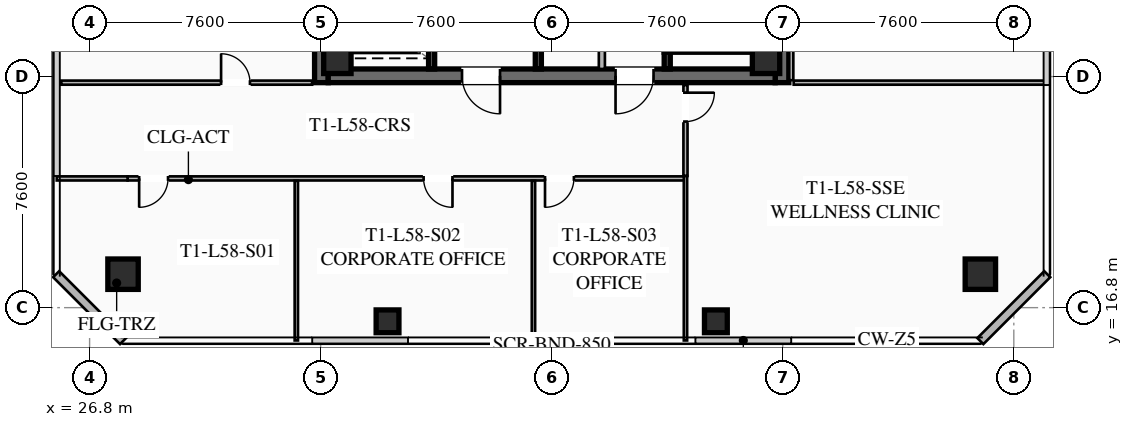
"""IFC4 building model, lengths in metres.
Left out: names, types, materials, properties, quantities, classifications, styles, units other than length and angle.
Written with IfcOpenShell. Run it as: python <this file> out.ifc"""

import sys

from ifc_helpers import new_model, si_unit, direction, frame, frame_2d, origin, origin_2d, place, context, subcontext, project, spatial, rectangle, hollow_rectangle, extrude, element, fill, save


model = new_model("IFC4")
c1 = context("Model", 3, precision=1e-05, world=origin(), true_north=direction((0.0, 1.0)))
c2 = subcontext(c1, "Body", "Model", "MODEL_VIEW")
j1 = project(units=[si_unit("LENGTHUNIT", "METRE"), si_unit("PLANEANGLEUNIT", "RADIAN")], contexts=[c1])
p1 = place(None, origin())
s1 = spatial("IfcSite", under=j1, at=p1, CompositionType="ELEMENT")
p2 = place(p1, origin())
s2 = spatial("IfcBuilding", under=s1, at=p2, CompositionType="ELEMENT")
p3 = place(p2, frame((0.0, 0.0, 214.85)))
s3 = spatial("IfcBuildingStorey", under=s2, at=p3, CompositionType="ELEMENT", Elevation=214.85)
for number, where, z_axis, x_axis in (
    (1, (34.425, 24.2, 0.0), (0.0, 0.0, 1.0), (0.0, 1.0, 0.0)),
    (2, (49.575, 39.8, 0.0), (0.0, 0.0, 1.0), (0.0, -1.0, 0.0)),
):
    element("IfcWall", number, at=place(p3, frame(where, z_axis=z_axis, x_axis=x_axis)), inside=s3, PredefinedType="SHEAR", context=c2, shape_type="SweptSolid", body=[
        extrude(rectangle(XDim=15.6, YDim=0.45, at=frame_2d((7.8, 0.0))), origin(), (0.0, 0.0, 1.0), 3.55),
    ])
p4 = place(p3, frame((49.35, 24.425, 0.0), z_axis=(0.0, 0.0, 1.0), x_axis=(-1.0, 0.0, 0.0)))
e3 = element("IfcWall", 3, at=p4, inside=s3, PredefinedType="SHEAR", context=c2, shape_type="SweptSolid", body=[
    extrude(rectangle(XDim=14.7, YDim=0.45, at=frame_2d((7.35, 0.0))), origin(), (0.0, 0.0, 1.0), 3.55),
])
p5 = place(p4, frame((9.05, 0.0, 0.0)))
e4 = element("IfcOpeningElement", 4, at=p5, cuts=e3, PredefinedType="OPENING", context=c2, shape_type="SweptSolid", body=[
    extrude(rectangle(XDim=1.25, YDim=2.25, at=frame_2d((0.625, 1.125))), frame((0.0, 0.235, 0.0), z_axis=(0.0, -1.0, 0.0), x_axis=(1.0, 0.0, 0.0)), (0.0, 0.0, 1.0), 0.47),
])
p6 = place(p4, frame((4.0, 0.0, 0.0)))
e5 = element("IfcOpeningElement", 5, at=p6, cuts=e3, PredefinedType="OPENING", context=c2, shape_type="SweptSolid", body=[
    extrude(rectangle(XDim=1.25, YDim=2.25, at=frame_2d((0.625, 1.125))), frame((0.0, 0.235, 0.0), z_axis=(0.0, -1.0, 0.0), x_axis=(1.0, 0.0, 0.0)), (0.0, 0.0, 1.0), 0.47),
])
for number, where, z_axis, x_axis in (
    (6, (34.95, 24.95, 0.0), (0.0, 0.0, 1.0), (1.0, 0.0, 0.0)),
    (7, (49.05, 24.95, 0.0), (0.0, 0.0, 1.0), (1.0, 0.0, 0.0)),
):
    element("IfcColumn", number, at=place(p3, frame(where, z_axis=z_axis, x_axis=x_axis)), inside=s3, PredefinedType="COLUMN", context=c2, shape_type="SweptSolid", body=[
        extrude(hollow_rectangle(XDim=0.9, YDim=0.9, WallThickness=0.04, at=origin_2d()), origin(), (0.0, 0.0, 1.0), 3.37),
    ])
for number, where, z_axis, x_axis in (
    (8, (27.9, 17.9, 0.0), (0.0, 0.0, 1.0), (1.0, 0.0, 0.0)),
    (9, (56.1, 17.9, 0.0), (0.0, 0.0, 1.0), (1.0, 0.0, 0.0)),
):
    element("IfcColumn", number, at=place(p3, frame(where, z_axis=z_axis, x_axis=x_axis)), inside=s3, PredefinedType="COLUMN", context=c2, shape_type="SweptSolid", body=[
        extrude(hollow_rectangle(XDim=1.0, YDim=1.0, WallThickness=0.04, at=origin_2d()), origin(), (0.0, 0.0, 1.0), 3.37),
    ])
for number, where, z_axis, x_axis in (
    (10, (36.6, 16.35, 0.0), (0.0, 0.0, 1.0), (1.0, 0.0, 0.0)),
    (11, (47.4, 16.35, 0.0), (0.0, 0.0, 1.0), (1.0, 0.0, 0.0)),
):
    element("IfcColumn", number, at=place(p3, frame(where, z_axis=z_axis, x_axis=x_axis)), inside=s3, PredefinedType="COLUMN", context=c2, shape_type="SweptSolid", body=[
        extrude(hollow_rectangle(XDim=0.75, YDim=0.75, WallThickness=0.032, at=origin_2d()), origin(), (0.0, 0.0, 1.0), 3.37),
    ])
for number, where, z_axis, x_axis in (
    (12, (27.9, 15.7, 0.0), (0.0, 0.0, 1.0), (-0.707, 0.707, 0.0)),
    (13, (58.3, 17.9, 0.0), (0.0, 0.0, 1.0), (-0.707, -0.707, 0.0)),
):
    element("IfcWall", number, at=place(p3, frame(where, z_axis=z_axis, x_axis=x_axis)), inside=s3, PredefinedType="SOLIDWALL", context=c2, shape_type="SweptSolid", body=[
        extrude(rectangle(XDim=3.111, YDim=0.28, at=frame_2d((1.556, 0.0))), origin(), (0.0, 0.0, 1.0), 3.37),
    ])
p7 = place(p3, frame((45.8, 32.8, 0.0), z_axis=(0.0, 0.0, 1.0), x_axis=(0.0, -1.0, 0.0)))
e14 = element("IfcWall", 14, at=p7, inside=s3, PredefinedType="SHEAR", context=c2, shape_type="SweptSolid", body=[
    extrude(rectangle(XDim=8.15, YDim=0.2, at=frame_2d((4.075, 0.0))), origin(), (0.0, 0.0, 1.0), 3.37),
])
p8 = place(p7, frame((0.45, 0.0, 0.0)))
e15 = element("IfcOpeningElement", 15, at=p8, cuts=e14, PredefinedType="OPENING", context=c2, shape_type="SweptSolid", body=[
    extrude(rectangle(XDim=1.15, YDim=2.2, at=frame_2d((0.575, 1.1))), frame((0.0, 0.11, 0.0), z_axis=(0.0, -1.0, 0.0), x_axis=(1.0, 0.0, 0.0)), (0.0, 0.0, 1.0), 0.22),
])
p9 = place(p3, frame((41.56, 24.65, 0.0), z_axis=(0.0, 0.0, 1.0), x_axis=(0.0, 1.0, 0.0)))
e16 = element("IfcWall", 16, at=p9, inside=s3, PredefinedType="SHEAR", context=c2, shape_type="SweptSolid", body=[
    extrude(rectangle(XDim=14.7, YDim=0.2, at=frame_2d((7.35, 0.0))), origin(), (0.0, 0.0, 1.0), 3.37),
])
p10 = place(p3, frame((38.05, 24.65, 0.0), z_axis=(0.0, 0.0, 1.0), x_axis=(0.0, 1.0, 0.0)))
e17 = element("IfcWall", 17, at=p10, inside=s3, PredefinedType="SHEAR", context=c2, shape_type="SweptSolid", body=[
    extrude(rectangle(XDim=6.55, YDim=0.2, at=frame_2d((3.275, 0.0))), origin(), (0.0, 0.0, 1.0), 3.37),
])
p11 = place(p10, frame((4.975, 0.0, 0.0)))
e18 = element("IfcOpeningElement", 18, at=p11, cuts=e17, PredefinedType="OPENING", context=c2, shape_type="SweptSolid", body=[
    extrude(rectangle(XDim=1.3, YDim=2.25, at=frame_2d((0.65, 1.125))), frame((0.0, 0.11, 0.0), z_axis=(0.0, -1.0, 0.0), x_axis=(1.0, 0.0, 0.0)), (0.0, 0.0, 1.0), 0.22),
])
p12 = place(p10, frame((2.975, 0.0, 0.0)))
e19 = element("IfcOpeningElement", 19, at=p12, cuts=e17, PredefinedType="OPENING", context=c2, shape_type="SweptSolid", body=[
    extrude(rectangle(XDim=1.3, YDim=2.25, at=frame_2d((0.65, 1.125))), frame((0.0, 0.11, 0.0), z_axis=(0.0, -1.0, 0.0), x_axis=(1.0, 0.0, 0.0)), (0.0, 0.0, 1.0), 0.22),
])
p13 = place(p10, frame((0.775, 0.0, 0.0)))
e20 = element("IfcOpeningElement", 20, at=p13, cuts=e17, PredefinedType="OPENING", context=c2, shape_type="SweptSolid", body=[
    extrude(rectangle(XDim=1.3, YDim=2.25, at=frame_2d((0.65, 1.125))), frame((0.0, 0.11, 0.0), z_axis=(0.0, -1.0, 0.0), x_axis=(1.0, 0.0, 0.0)), (0.0, 0.0, 1.0), 0.22),
])
p14 = place(p3, frame((43.65, 24.65, 0.0), z_axis=(0.0, 0.0, 1.0), x_axis=(0.0, 1.0, 0.0)))
e21 = element("IfcWall", 21, at=p14, inside=s3, PredefinedType="SOLIDWALL", context=c2, shape_type="SweptSolid", body=[
    extrude(rectangle(XDim=7.0, YDim=0.2, at=frame_2d((3.5, 0.0))), origin(), (0.0, 0.0, 1.0), 2.723),
])
p15 = place(p14, frame((0.85, 0.0, 0.0)))
e22 = element("IfcOpeningElement", 22, at=p15, cuts=e21, PredefinedType="OPENING", context=c2, shape_type="SweptSolid", body=[
    extrude(rectangle(XDim=0.95, YDim=2.05, at=frame_2d((0.475, 1.025))), frame((0.0, 0.11, 0.0), z_axis=(0.0, -1.0, 0.0), x_axis=(1.0, 0.0, 0.0)), (0.0, 0.0, 1.0), 0.22),
])
p16 = place(p14, frame((4.8, 0.0, 0.0)))
e23 = element("IfcOpeningElement", 23, at=p16, cuts=e21, PredefinedType="OPENING", context=c2, shape_type="SweptSolid", body=[
    extrude(rectangle(XDim=1.05, YDim=2.2, at=frame_2d((0.525, 1.1))), frame((0.0, 0.11, 0.0), z_axis=(0.0, -1.0, 0.0), x_axis=(1.0, 0.0, 0.0)), (0.0, 0.0, 1.0), 0.22),
])
p17 = place(p3, frame((46.4, 21.05, 0.0), z_axis=(0.0, 0.0, 1.0), x_axis=(-1.0, 0.0, 0.0)))
e24 = element("IfcWall", 24, at=p17, inside=s3, PredefinedType="PARTITIONING", context=c2, shape_type="SweptSolid", body=[
    extrude(rectangle(XDim=18.35, YDim=0.135, at=frame_2d((9.175, 0.0))), origin(), (0.0, 0.0, 1.0), 2.723),
])
p18 = place(p17, frame((17.02, 0.0, 0.0)))
e25 = element("IfcOpeningElement", 25, at=p18, cuts=e24, PredefinedType="OPENING", context=c2, shape_type="SweptSolid", body=[
    extrude(rectangle(XDim=0.95, YDim=2.05, at=frame_2d((0.475, 1.025))), frame((0.0, 0.077, 0.0), z_axis=(0.0, -1.0, 0.0), x_axis=(1.0, 0.0, 0.0)), (0.0, 0.0, 1.0), 0.155),
])
p19 = place(p17, frame((7.664, 0.0, 0.0)))
e26 = element("IfcOpeningElement", 26, at=p19, cuts=e24, PredefinedType="OPENING", context=c2, shape_type="SweptSolid", body=[
    extrude(rectangle(XDim=0.95, YDim=2.05, at=frame_2d((0.475, 1.025))), frame((0.0, 0.077, 0.0), z_axis=(0.0, -1.0, 0.0), x_axis=(1.0, 0.0, 0.0)), (0.0, 0.0, 1.0), 0.155),
])
p20 = place(p17, frame((3.67, 0.0, 0.0)))
e27 = element("IfcOpeningElement", 27, at=p20, cuts=e24, PredefinedType="OPENING", context=c2, shape_type="SweptSolid", body=[
    extrude(rectangle(XDim=0.95, YDim=2.05, at=frame_2d((0.475, 1.025))), frame((0.0, 0.077, 0.0), z_axis=(0.0, -1.0, 0.0), x_axis=(1.0, 0.0, 0.0)), (0.0, 0.0, 1.0), 0.155),
])
p21 = place(p3, frame((25.72, 21.05, 0.0), z_axis=(0.0, 0.0, 1.0), x_axis=(1.0, 0.0, 0.0)))
e28 = element("IfcWall", 28, at=p21, inside=s3, PredefinedType="PARTITIONING", context=c2, shape_type="SweptSolid", body=[
    extrude(rectangle(XDim=2.33, YDim=0.135, at=frame_2d((1.165, 0.0))), origin(), (0.0, 0.0, 1.0), 2.723),
])
p22 = place(p3, frame((46.4, 24.12, 0.0), z_axis=(0.0, 0.0, 1.0), x_axis=(0.0, -1.0, 0.0)))
e29 = element("IfcWall", 29, at=p22, inside=s3, PredefinedType="PARTITIONING", context=c2, shape_type="SweptSolid", body=[
    extrude(rectangle(XDim=2.99, YDim=0.135, at=frame_2d((1.495, 0.0))), origin(), (0.0, 0.0, 1.0), 2.723),
])
p23 = place(p22, frame((0.25, 0.0, 0.0)))
e30 = element("IfcOpeningElement", 30, at=p23, cuts=e29, PredefinedType="OPENING", context=c2, shape_type="SweptSolid", body=[
    extrude(rectangle(XDim=0.95, YDim=2.05, at=frame_2d((0.475, 1.025))), frame((0.0, 0.077, 0.0), z_axis=(0.0, -1.0, 0.0), x_axis=(1.0, 0.0, 0.0)), (0.0, 0.0, 1.0), 0.155),
])
for number, where, z_axis, x_axis in (
    (31, (33.6, 15.72, 0.0), (0.0, 0.0, 1.0), (0.0, 1.0, 0.0)),
    (32, (41.4, 15.72, 0.0), (0.0, 0.0, 1.0), (0.0, 1.0, 0.0)),
):
    element("IfcWall", number, at=place(p3, frame(where, z_axis=z_axis, x_axis=x_axis)), inside=s3, PredefinedType="PARTITIONING", context=c2, shape_type="SweptSolid", body=[
        extrude(rectangle(XDim=5.25, YDim=0.11, at=frame_2d((2.625, 0.0))), origin(), (0.0, 0.0, 1.0), 2.723),
    ])
p24 = place(p3, frame((46.4, 15.72, 0.0), z_axis=(0.0, 0.0, 1.0), x_axis=(0.0, 1.0, 0.0)))
e33 = element("IfcWall", 33, at=p24, inside=s3, PredefinedType="PARTITIONING", context=c2, shape_type="SweptSolid", body=[
    extrude(rectangle(XDim=5.41, YDim=0.11, at=frame_2d((2.705, 0.0))), origin(), (0.0, 0.0, 1.0), 2.723),
])
p25 = place(p3, frame((49.88, 39.72, 0.0), z_axis=(0.0, 0.0, 1.0), x_axis=(0.0, -1.0, 0.0)))
e34 = element("IfcWall", 34, at=p25, inside=s3, PredefinedType="PARTITIONING", context=c2, shape_type="SweptSolid", body=[
    extrude(rectangle(XDim=15.44, YDim=0.135, at=frame_2d((7.72, 0.0))), origin(), (0.0, 0.0, 1.0), 2.723),
])
p26 = place(p3, frame((49.96, 24.2, 0.0), z_axis=(0.0, 0.0, 1.0), x_axis=(1.0, 0.0, 0.0)))
e35 = element("IfcWall", 35, at=p26, inside=s3, PredefinedType="PARTITIONING", context=c2, shape_type="SweptSolid", body=[
    extrude(rectangle(XDim=8.32, YDim=0.135, at=frame_2d((4.16, 0.0))), origin(), (0.0, 0.0, 1.0), 2.723),
])
p27 = place(p3, frame((25.87, 24.2, 0.0), z_axis=(0.0, 0.0, 1.0), x_axis=(1.0, 0.0, 0.0)))
e36 = element("IfcWall", 36, at=p27, inside=s3, PredefinedType="PARTITIONING", context=c2, shape_type="SweptSolid", body=[
    extrude(rectangle(XDim=8.25, YDim=0.135, at=frame_2d((4.125, 0.0))), origin(), (0.0, 0.0, 1.0), 2.723),
])
p28 = place(p27, frame((5.255, 0.0, 0.0)))
e37 = element("IfcOpeningElement", 37, at=p28, cuts=e36, PredefinedType="OPENING", context=c2, shape_type="SweptSolid", body=[
    extrude(rectangle(XDim=0.95, YDim=2.05, at=frame_2d((0.475, 1.025))), frame((0.0, 0.077, 0.0), z_axis=(0.0, -1.0, 0.0), x_axis=(1.0, 0.0, 0.0)), (0.0, 0.0, 1.0), 0.155),
])
p29 = place(p5, origin())
e38 = element("IfcDoor", 38, at=p29, inside=s3, OperationType="SINGLE_SWING_LEFT", PredefinedType="DOOR", context=c2, shape_type="SweptSolid", body=[
    extrude(rectangle(XDim=1.25, YDim=2.25, at=frame_2d((0.625, 1.125))), frame((0.0, 0.025, 0.0), z_axis=(0.0, -1.0, 0.0), x_axis=(1.0, 0.0, 0.0)), (0.0, 0.0, 1.0), 0.05),
])
fill(e4, e38)
p30 = place(p6, origin())
e39 = element("IfcDoor", 39, at=p30, inside=s3, OperationType="SINGLE_SWING_RIGHT", PredefinedType="DOOR", context=c2, shape_type="SweptSolid", body=[
    extrude(rectangle(XDim=1.25, YDim=2.25, at=frame_2d((0.625, 1.125))), frame((0.0, 0.025, 0.0), z_axis=(0.0, -1.0, 0.0), x_axis=(1.0, 0.0, 0.0)), (0.0, 0.0, 1.0), 0.05),
])
fill(e5, e39)
p31 = place(p18, origin())
e40 = element("IfcDoor", 40, at=p31, inside=s3, OperationType="SINGLE_SWING_RIGHT", PredefinedType="DOOR", context=c2, shape_type="SweptSolid", body=[
    extrude(rectangle(XDim=0.95, YDim=2.05, at=frame_2d((0.475, 1.025))), frame((0.0, 0.025, 0.0), z_axis=(0.0, -1.0, 0.0), x_axis=(1.0, 0.0, 0.0)), (0.0, 0.0, 1.0), 0.05),
])
fill(e25, e40)
p32 = place(p19, origin())
e41 = element("IfcDoor", 41, at=p32, inside=s3, OperationType="SINGLE_SWING_LEFT", PredefinedType="DOOR", context=c2, shape_type="SweptSolid", body=[
    extrude(rectangle(XDim=0.95, YDim=2.05, at=frame_2d((0.475, 1.025))), frame((0.0, 0.025, 0.0), z_axis=(0.0, -1.0, 0.0), x_axis=(1.0, 0.0, 0.0)), (0.0, 0.0, 1.0), 0.05),
])
fill(e26, e41)
p33 = place(p20, origin())
e42 = element("IfcDoor", 42, at=p33, inside=s3, OperationType="SINGLE_SWING_RIGHT", PredefinedType="DOOR", context=c2, shape_type="SweptSolid", body=[
    extrude(rectangle(XDim=0.95, YDim=2.05, at=frame_2d((0.475, 1.025))), frame((0.0, 0.025, 0.0), z_axis=(0.0, -1.0, 0.0), x_axis=(1.0, 0.0, 0.0)), (0.0, 0.0, 1.0), 0.05),
])
fill(e27, e42)
p34 = place(p23, origin())
e43 = element("IfcDoor", 43, at=p34, inside=s3, OperationType="SINGLE_SWING_LEFT", PredefinedType="DOOR", context=c2, shape_type="SweptSolid", body=[
    extrude(rectangle(XDim=0.95, YDim=2.05, at=frame_2d((0.475, 1.025))), frame((0.0, 0.025, 0.0), z_axis=(0.0, -1.0, 0.0), x_axis=(1.0, 0.0, 0.0)), (0.0, 0.0, 1.0), 0.05),
])
fill(e30, e43)
p35 = place(p28, origin())
e44 = element("IfcDoor", 44, at=p35, inside=s3, OperationType="SINGLE_SWING_LEFT", PredefinedType="DOOR", context=c2, shape_type="SweptSolid", body=[
    extrude(rectangle(XDim=0.95, YDim=2.05, at=frame_2d((0.475, 1.025))), frame((0.0, 0.025, 0.0), z_axis=(0.0, -1.0, 0.0), x_axis=(1.0, 0.0, 0.0)), (0.0, 0.0, 1.0), 0.05),
])
fill(e37, e44)
save(model, sys.argv[1])
